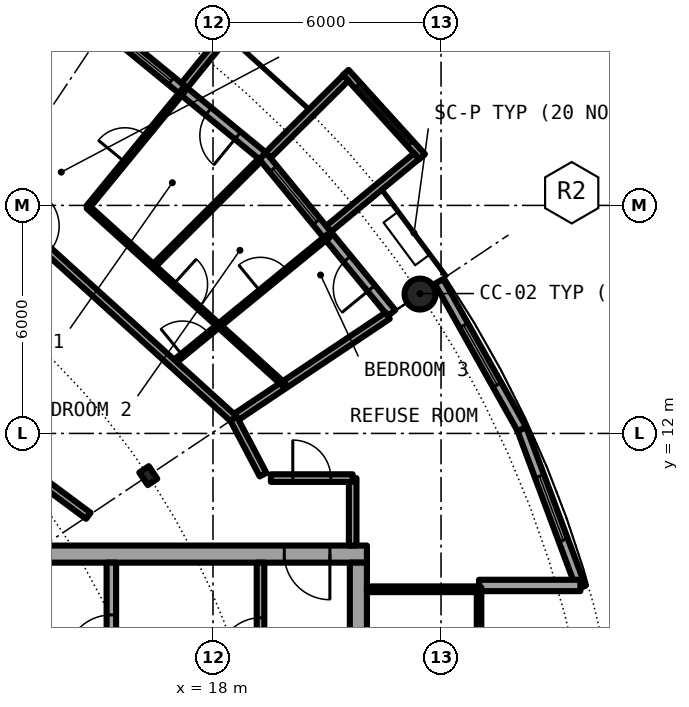
"""IFC4 building model, lengths in metres.
Left out: names, types, materials, properties, quantities, classifications, styles, units other than length and angle.
Written with IfcOpenShell. Run it as: python <this file> out.ifc"""

import sys

from ifc_helpers import new_model, si_unit, direction, frame, frame_2d, origin, origin_2d, place, context, subcontext, project, spatial, rectangle, circle, hollow_circle, i_section, extrude, element, fill, save


model = new_model("IFC4")
c1 = context("Model", 3, precision=1e-05, world=origin(), true_north=direction((0.0, 1.0)))
c2 = subcontext(c1, "Body", "Model", "MODEL_VIEW")
j1 = project(units=[si_unit("LENGTHUNIT", "METRE"), si_unit("PLANEANGLEUNIT", "RADIAN")], contexts=[c1])
p1 = place(None, origin())
s1 = spatial("IfcSite", under=j1, at=p1, CompositionType="ELEMENT")
p2 = place(p1, origin())
s2 = spatial("IfcBuilding", under=s1, at=p2, CompositionType="ELEMENT")
p3 = place(p2, frame((0.0, 0.0, 190.2)))
s3 = spatial("IfcBuildingStorey", under=s2, at=p3, CompositionType="ELEMENT", Elevation=190.2)
p4 = place(p3, frame((23.448, 15.667, 0.0), z_axis=(0.0, 0.0, 1.0), x_axis=(1.0, 0.0, 0.0)))
e1 = element("IfcColumn", 1, at=p4, inside=s3, PredefinedType="COLUMN", context=c2, shape_type="SweptSolid", body=[
    extrude(hollow_circle(Radius=0.406, WallThickness=0.03, at=origin_2d()), origin(), (0.0, 0.0, 1.0), 3.05),
])
p5 = place(p3, frame((16.297, 10.889, 0.0), z_axis=(0.0, 0.0, 1.0), x_axis=(0.831469612303, 0.55557023302, 0.0)))
e2 = element("IfcColumn", 2, at=p5, inside=s3, PredefinedType="COLUMN", context=c2, shape_type="SweptSolid", body=[
    extrude(i_section(OverallWidth=0.3, OverallDepth=0.4, WebThickness=0.013, FlangeThickness=0.024, FilletRadius=0.027, at=origin_2d()), origin(), (0.0, 0.0, 1.0), 3.05),
])
p6 = place(p3, frame((22.699, 15.167, 0.0), z_axis=(0.0, 0.0, 1.0), x_axis=(-0.634382322723, 0.773019449054, 0.0)))
e3 = element("IfcWall", 3, at=p6, inside=s3, PredefinedType="SOLIDWALL", context=c2, shape_type="SweptSolid", body=[
    extrude(rectangle(XDim=5.352, YDim=0.25, at=frame_2d((2.676, 0.0))), origin(), (0.0, 0.0, 1.0), 2.7),
])
p7 = place(p6, frame((0.841, 0.0, 0.0)))
e4 = element("IfcOpeningElement", 4, at=p7, cuts=e3, PredefinedType="OPENING", context=c2, shape_type="SweptSolid", body=[
    extrude(rectangle(XDim=1.0, YDim=2.2, at=frame_2d((0.5, 1.1))), frame((0.0, 0.135, 0.0), z_axis=(0.0, -1.0, 0.0), x_axis=(1.0, 0.0, 0.0)), (0.0, 0.0, 1.0), 0.27),
])
p8 = place(p6, frame((3.111, 0.0, 0.3)))
e5 = element("IfcOpeningElement", 5, at=p8, cuts=e3, PredefinedType="OPENING", context=c2, shape_type="SweptSolid", body=[
    extrude(rectangle(XDim=1.8, YDim=2.1, at=frame_2d((0.9, 1.05))), frame((0.0, 0.135, 0.0), z_axis=(0.0, -1.0, 0.0), x_axis=(1.0, 0.0, 0.0)), (0.0, 0.0, 1.0), 0.27),
])
p9 = place(p3, frame((23.503, 19.282, -0.03), z_axis=(0.0, 0.0, 1.0), x_axis=(-0.671506829416, 0.740998365753, 0.0)))
e6 = element("IfcWall", 6, at=p9, inside=s3, PredefinedType="SOLIDWALL", context=c2, shape_type="SweptSolid", body=[
    extrude(rectangle(XDim=2.993, YDim=0.2, at=frame_2d((1.497, 0.0))), origin(), (0.0, 0.0, 1.0), 2.73),
])
p10 = place(p9, frame((0.457, 0.0, 0.33)))
e7 = element("IfcOpeningElement", 7, at=p10, cuts=e6, PredefinedType="OPENING", context=c2, shape_type="SweptSolid", body=[
    extrude(circle(Radius=1.04, at=frame_2d((1.04, 1.04))), frame((0.0, 0.11, 0.0), z_axis=(0.0, -1.0, 0.0), x_axis=(1.0, 0.0, 0.0)), (0.0, 0.0, 1.0), 0.22),
])
p11 = place(p3, frame((21.041, 17.384, -0.03), z_axis=(0.0, 0.0, 1.0), x_axis=(0.770784861449, 0.63709551667, 0.0)))
e8 = element("IfcWall", 8, at=p11, inside=s3, PredefinedType="SOLIDWALL", context=c2, shape_type="SweptSolid", body=[
    extrude(rectangle(XDim=3.006, YDim=0.2, at=frame_2d((1.503, 0.0))), origin(), (0.0, 0.0, 1.0), 2.73),
])
p12 = place(p3, frame((19.45, 19.323, -0.03), z_axis=(0.0, 0.0, 1.0), x_axis=(0.709727076896, 0.704476739375, 0.0)))
e9 = element("IfcWall", 9, at=p12, inside=s3, PredefinedType="SOLIDWALL", context=c2, shape_type="SweptSolid", body=[
    extrude(rectangle(XDim=2.883, YDim=0.2, at=frame_2d((1.441, 0.0))), origin(), (0.0, 0.0, 1.0), 2.73),
])
p13 = place(p3, frame((19.304, 19.304, 0.0), z_axis=(0.0, 0.0, 1.0), x_axis=(-0.773019449054, 0.634382322723, 0.0)))
e10 = element("IfcWall", 10, at=p13, inside=s3, PredefinedType="SOLIDWALL", context=c2, shape_type="SweptSolid", body=[
    extrude(rectangle(XDim=5.352, YDim=0.25, at=frame_2d((2.676, 0.0))), origin(), (0.0, 0.0, 1.0), 2.7),
])
p14 = place(p13, frame((0.841, 0.0, 0.0)))
e11 = element("IfcOpeningElement", 11, at=p14, cuts=e10, PredefinedType="OPENING", context=c2, shape_type="SweptSolid", body=[
    extrude(rectangle(XDim=1.0, YDim=2.2, at=frame_2d((0.5, 1.1))), frame((0.0, 0.135, 0.0), z_axis=(0.0, -1.0, 0.0), x_axis=(1.0, 0.0, 0.0)), (0.0, 0.0, 1.0), 0.27),
])
p15 = place(p13, frame((3.111, 0.0, 0.3)))
e12 = element("IfcOpeningElement", 12, at=p15, cuts=e10, PredefinedType="OPENING", context=c2, shape_type="SweptSolid", body=[
    extrude(rectangle(XDim=1.8, YDim=2.1, at=frame_2d((0.9, 1.05))), frame((0.0, 0.135, 0.0), z_axis=(0.0, -1.0, 0.0), x_axis=(1.0, 0.0, 0.0)), (0.0, 0.0, 1.0), 0.27),
])
p16 = place(p3, frame((17.246, 21.155, -0.03), z_axis=(0.0, 0.0, 1.0), x_axis=(0.631741648902, 0.775179004516, 0.0)))
e13 = element("IfcWall", 13, at=p16, inside=s3, PredefinedType="SOLIDWALL", context=c2, shape_type="SweptSolid", body=[
    extrude(rectangle(XDim=3.006, YDim=0.2, at=frame_2d((1.503, 0.0))), origin(), (0.0, 0.0, 1.0), 2.73),
])
p17 = place(p3, frame((27.682, 7.945, 0.0), z_axis=(0.0, 0.0, 1.0), x_axis=(-0.349247811493, 0.937030397675, 0.0)))
e14 = element("IfcWall", 14, at=p17, inside=s3, PredefinedType="SOLIDWALL", context=c2, shape_type="SweptSolid", body=[
    extrude(rectangle(XDim=4.452, YDim=0.25, at=frame_2d((2.226, 0.0))), origin(), (0.0, 0.0, 1.0), 2.7),
])
p18 = place(p17, frame((1.327, 0.0, 0.3)))
e15 = element("IfcOpeningElement", 15, at=p18, cuts=e14, PredefinedType="OPENING", context=c2, shape_type="SweptSolid", body=[
    extrude(rectangle(XDim=1.8, YDim=2.1, at=frame_2d((0.9, 1.05))), frame((0.0, 0.135, 0.0), z_axis=(0.0, -1.0, 0.0), x_axis=(1.0, 0.0, 0.0)), (0.0, 0.0, 1.0), 0.27),
])
p19 = place(p3, frame((26.127, 12.117, 0.0), z_axis=(0.0, 0.0, 1.0), x_axis=(-0.489696356642, 0.871893042919, 0.0)))
e16 = element("IfcWall", 16, at=p19, inside=s3, PredefinedType="SOLIDWALL", context=c2, shape_type="SweptSolid", body=[
    extrude(rectangle(XDim=4.454, YDim=0.25, at=frame_2d((2.227, 0.0))), origin(), (0.0, 0.0, 1.0), 2.7),
])
p20 = place(p19, frame((1.327, 0.0, 0.3)))
e17 = element("IfcOpeningElement", 17, at=p20, cuts=e16, PredefinedType="OPENING", context=c2, shape_type="SweptSolid", body=[
    extrude(rectangle(XDim=1.8, YDim=2.1, at=frame_2d((0.9, 1.05))), frame((0.0, 0.135, 0.0), z_axis=(0.0, -1.0, 0.0), x_axis=(1.0, 0.0, 0.0)), (0.0, 0.0, 1.0), 0.27),
])
p21 = place(p3, frame((25.0, 8.0, 0.0), z_axis=(0.0, 0.0, 1.0), x_axis=(1.0, 0.0, 0.0)))
e18 = element("IfcWall", 18, at=p21, inside=s3, PredefinedType="SOLIDWALL", context=c2, shape_type="SweptSolid", body=[
    extrude(rectangle(XDim=2.667, YDim=0.3, at=frame_2d((1.333, 0.0))), origin(), (0.0, 0.0, 1.0), 2.7),
])
p22 = place(p3, frame((22.05, 8.825, 0.0), z_axis=(0.0, 0.0, 1.0), x_axis=(-1.0, 0.0, 0.0)))
e19 = element("IfcWall", 19, at=p22, inside=s3, PredefinedType="SHEAR", context=c2, shape_type="SweptSolid", body=[
    extrude(rectangle(XDim=13.5, YDim=0.45, at=frame_2d((6.75, 0.0))), origin(), (0.0, 0.0, 1.0), 3.05),
])
p23 = place(p22, frame((0.975, 0.0, 0.0)))
e20 = element("IfcOpeningElement", 20, at=p23, cuts=e19, PredefinedType="OPENING", context=c2, shape_type="SweptSolid", body=[
    extrude(rectangle(XDim=1.2, YDim=2.3, at=frame_2d((0.6, 1.15))), frame((0.0, 0.235, 0.0), z_axis=(0.0, -1.0, 0.0), x_axis=(1.0, 0.0, 0.0)), (0.0, 0.0, 1.0), 0.47),
])
p24 = place(p3, frame((21.825, 8.6, 0.0), z_axis=(0.0, 0.0, 1.0), x_axis=(0.0, -1.0, 0.0)))
e21 = element("IfcWall", 21, at=p24, inside=s3, PredefinedType="SHEAR", context=c2, shape_type="SweptSolid", body=[
    extrude(rectangle(XDim=17.2, YDim=0.45, at=frame_2d((8.6, 0.0))), origin(), (0.0, 0.0, 1.0), 3.05),
])
p25 = place(p24, frame((7.7, 0.0, 0.0)))
e22 = element("IfcOpeningElement", 22, at=p25, cuts=e21, PredefinedType="OPENING", context=c2, shape_type="SweptSolid", body=[
    extrude(rectangle(XDim=1.8, YDim=2.3, at=frame_2d((0.9, 1.15))), frame((0.0, 0.235, 0.0), z_axis=(0.0, -1.0, 0.0), x_axis=(1.0, 0.0, 0.0)), (0.0, 0.0, 1.0), 0.47),
])
p26 = place(p3, frame((15.325, 4.65, 0.0), z_axis=(0.0, 0.0, 1.0), x_axis=(0.0, 1.0, 0.0)))
e23 = element("IfcWall", 23, at=p26, inside=s3, PredefinedType="SHEAR", context=c2, shape_type="SweptSolid", body=[
    extrude(rectangle(XDim=3.95, YDim=0.25, at=frame_2d((1.975, 0.0))), origin(), (0.0, 0.0, 1.0), 3.05),
])
p27 = place(p26, frame((1.375, 0.0, 0.0)))
e24 = element("IfcOpeningElement", 24, at=p27, cuts=e23, PredefinedType="OPENING", context=c2, shape_type="SweptSolid", body=[
    extrude(rectangle(XDim=1.2, YDim=2.3, at=frame_2d((0.6, 1.15))), frame((0.0, 0.135, 0.0), z_axis=(0.0, -1.0, 0.0), x_axis=(1.0, 0.0, 0.0)), (0.0, 0.0, 1.0), 0.27),
])
p28 = place(p3, frame((19.25, 1.575, 0.0), z_axis=(0.0, 0.0, 1.0), x_axis=(0.0, 1.0, 0.0)))
e25 = element("IfcWall", 25, at=p28, inside=s3, PredefinedType="SOLIDWALL", context=c2, shape_type="SweptSolid", body=[
    extrude(rectangle(XDim=7.025, YDim=0.2, at=frame_2d((3.513, 0.0))), origin(), (0.0, 0.0, 1.0), 2.7),
])
p29 = place(p28, frame((4.475, 0.0, 0.0)))
e26 = element("IfcOpeningElement", 26, at=p29, cuts=e25, PredefinedType="OPENING", context=c2, shape_type="SweptSolid", body=[
    extrude(rectangle(XDim=1.1, YDim=2.3, at=frame_2d((0.55, 1.15))), frame((0.0, 0.11, 0.0), z_axis=(0.0, -1.0, 0.0), x_axis=(1.0, 0.0, 0.0)), (0.0, 0.0, 1.0), 0.22),
])
p30 = place(p3, frame((22.05, 7.9, 0.0), z_axis=(0.0, 0.0, 1.0), x_axis=(1.0, 0.0, 0.0)))
e27 = element("IfcWall", 27, at=p30, inside=s3, PredefinedType="PARTITIONING", context=c2, shape_type="SweptSolid", body=[
    extrude(rectangle(XDim=2.89, YDim=0.15, at=frame_2d((1.445, 0.0))), origin(), (0.0, 0.0, 1.0), 2.7),
])
p31 = place(p3, frame((25.0, -7.95, 0.0), z_axis=(0.0, 0.0, 1.0), x_axis=(0.0, 1.0, 0.0)))
e28 = element("IfcWall", 28, at=p31, inside=s3, PredefinedType="PARTITIONING", context=c2, shape_type="SweptSolid", body=[
    extrude(rectangle(XDim=15.9, YDim=0.12, at=frame_2d((7.95, 0.0))), origin(), (0.0, 0.0, 1.0), 2.7),
])
p32 = place(p31, frame((0.95, 0.0, 0.1)))
e29 = element("IfcOpeningElement", 29, at=p32, cuts=e28, PredefinedType="OPENING", context=c2, shape_type="SweptSolid", body=[
    extrude(rectangle(XDim=14.0, YDim=2.35, at=frame_2d((7.0, 1.175))), frame((0.0, 0.07, 0.0), z_axis=(0.0, -1.0, 0.0), x_axis=(1.0, 0.0, 0.0)), (0.0, 0.0, 1.0), 0.14),
])
p33 = place(p3, frame((21.675, 9.05, 0.0), z_axis=(0.0, 0.0, 1.0), x_axis=(0.0, 1.0, 0.0)))
e30 = element("IfcWall", 30, at=p33, inside=s3, PredefinedType="PARTITIONING", context=c2, shape_type="SweptSolid", body=[
    extrude(rectangle(XDim=1.775, YDim=0.2, at=frame_2d((0.887, 0.0))), origin(), (0.0, 0.0, 1.0), 2.7),
])
p34 = place(p3, frame((14.709, 17.958, 0.0), z_axis=(0.0, 0.0, 1.0), x_axis=(0.633590098448, 0.773668913133, 0.0)))
e31 = element("IfcWall", 31, at=p34, inside=s3, PredefinedType="PARTITIONING", context=c2, shape_type="SweptSolid", body=[
    extrude(rectangle(XDim=3.962, YDim=0.1, at=frame_2d((1.981, 0.0))), origin(), (0.0, 0.0, 1.0), 2.7),
])
p35 = place(p34, frame((1.531, 0.0, 0.0)))
e32 = element("IfcOpeningElement", 32, at=p35, cuts=e31, PredefinedType="OPENING", context=c2, shape_type="SweptSolid", body=[
    extrude(rectangle(XDim=0.9, YDim=2.3, at=frame_2d((0.45, 1.15))), frame((0.0, 0.06, 0.0), z_axis=(0.0, -1.0, 0.0), x_axis=(1.0, 0.0, 0.0)), (0.0, 0.0, 1.0), 0.12),
])
p36 = place(p3, frame((16.43, 16.398, 0.0), z_axis=(0.0, 0.0, 1.0), x_axis=(0.707722727509, 0.706490297858, 0.0)))
e33 = element("IfcWall", 33, at=p36, inside=s3, PredefinedType="PARTITIONING", context=c2, shape_type="SweptSolid", body=[
    extrude(rectangle(XDim=3.962, YDim=0.1, at=frame_2d((1.981, 0.0))), origin(), (0.0, 0.0, 1.0), 2.7),
])
p37 = place(p3, frame((16.936, 13.845, 0.0), z_axis=(0.0, 0.0, 1.0), x_axis=(0.774310172558, 0.632806255241, 0.0)))
e34 = element("IfcWall", 34, at=p37, inside=s3, PredefinedType="PARTITIONING", context=c2, shape_type="SweptSolid", body=[
    extrude(rectangle(XDim=5.3, YDim=0.1, at=frame_2d((2.65, 0.0))), origin(), (0.0, 0.0, 1.0), 2.7),
])
p38 = place(p37, frame((0.335, 0.0, 0.0)))
e35 = element("IfcOpeningElement", 35, at=p38, cuts=e34, PredefinedType="OPENING", context=c2, shape_type="SweptSolid", body=[
    extrude(rectangle(XDim=0.9, YDim=2.3, at=frame_2d((0.45, 1.15))), frame((0.0, 0.06, 0.0), z_axis=(0.0, -1.0, 0.0), x_axis=(1.0, 0.0, 0.0)), (0.0, 0.0, 1.0), 0.12),
])
p39 = place(p37, frame((2.985, 0.0, 0.0)))
e36 = element("IfcOpeningElement", 36, at=p39, cuts=e34, PredefinedType="OPENING", context=c2, shape_type="SweptSolid", body=[
    extrude(rectangle(XDim=0.9, YDim=2.3, at=frame_2d((0.45, 1.15))), frame((0.0, 0.06, 0.0), z_axis=(0.0, -1.0, 0.0), x_axis=(1.0, 0.0, 0.0)), (0.0, 0.0, 1.0), 0.12),
])
p40 = place(p3, frame((18.542, 12.389, 0.0), z_axis=(0.0, 0.0, 1.0), x_axis=(0.831387096605, 0.55569370664, 0.0)))
e37 = element("IfcWall", 37, at=p40, inside=s3, PredefinedType="PARTITIONING", context=c2, shape_type="SweptSolid", body=[
    extrude(rectangle(XDim=4.875, YDim=0.2, at=frame_2d((2.438, 0.0))), origin(), (0.0, 0.0, 1.0), 2.7),
])
p41 = place(p3, frame((19.523, 10.825, 0.0), z_axis=(0.0, 0.0, 1.0), x_axis=(1.0, 0.0, 0.0)))
e38 = element("IfcWall", 38, at=p41, inside=s3, PredefinedType="PARTITIONING", context=c2, shape_type="SweptSolid", body=[
    extrude(rectangle(XDim=2.152, YDim=0.2, at=frame_2d((1.076, 0.0))), origin(), (0.0, 0.0, 1.0), 2.7),
])
p42 = place(p41, frame((0.576, 0.0, 0.0)))
e39 = element("IfcOpeningElement", 39, at=p42, cuts=e38, PredefinedType="OPENING", context=c2, shape_type="SweptSolid", body=[
    extrude(rectangle(XDim=1.0, YDim=2.3, at=frame_2d((0.5, 1.15))), frame((0.0, 0.11, 0.0), z_axis=(0.0, -1.0, 0.0), x_axis=(1.0, 0.0, 0.0)), (0.0, 0.0, 1.0), 0.22),
])
p43 = place(p3, frame((5.137, 16.938, 0.0), z_axis=(0.0, 0.0, 1.0), x_axis=(0.803240181354, -0.595655278712, 0.0)))
e40 = element("IfcWall", 40, at=p43, inside=s3, PredefinedType="PARTITIONING", context=c2, shape_type="SweptSolid", body=[
    extrude(rectangle(XDim=11.928, YDim=0.2, at=frame_2d((5.964, 0.0))), origin(), (0.0, 0.0, 1.0), 2.7),
])
p44 = place(p43, frame((4.612, 0.0, 0.0)))
e41 = element("IfcOpeningElement", 41, at=p44, cuts=e40, PredefinedType="OPENING", context=c2, shape_type="SweptSolid", body=[
    extrude(rectangle(XDim=1.0, YDim=2.3, at=frame_2d((0.5, 1.15))), frame((0.0, 0.11, 0.0), z_axis=(0.0, -1.0, 0.0), x_axis=(1.0, 0.0, 0.0)), (0.0, 0.0, 1.0), 0.22),
])
p45 = place(p3, frame((10.512, 19.667, 0.0), z_axis=(0.0, 0.0, 1.0), x_axis=(0.740853508928, -0.671666642248, 0.0)))
e42 = element("IfcWall", 42, at=p45, inside=s3, PredefinedType="PARTITIONING", context=c2, shape_type="SweptSolid", body=[
    extrude(rectangle(XDim=10.84, YDim=0.2, at=frame_2d((5.42, 0.0))), origin(), (0.0, 0.0, 1.0), 2.7),
])
p46 = place(p45, frame((3.293, 0.0, 0.0)))
e43 = element("IfcOpeningElement", 43, at=p46, cuts=e42, PredefinedType="OPENING", context=c2, shape_type="SweptSolid", body=[
    extrude(rectangle(XDim=1.0, YDim=2.3, at=frame_2d((0.5, 1.15))), frame((0.0, 0.11, 0.0), z_axis=(0.0, -1.0, 0.0), x_axis=(1.0, 0.0, 0.0)), (0.0, 0.0, 1.0), 0.22),
])
p47 = place(p3, frame((18.542, 12.389, 0.0), z_axis=(0.0, 0.0, 1.0), x_axis=(0.465359652486, -0.885121683068, 0.0)))
e44 = element("IfcWall", 44, at=p47, inside=s3, PredefinedType="PARTITIONING", context=c2, shape_type="SweptSolid", body=[
    extrude(rectangle(XDim=1.665, YDim=0.2, at=frame_2d((0.833, 0.0))), origin(), (0.0, 0.0, 1.0), 2.7),
])
p48 = place(p3, frame((14.709, 17.958, 0.0), z_axis=(0.0, 0.0, 1.0), x_axis=(0.740923753351, -0.671589153962, 0.0)))
e45 = element("IfcWall", 45, at=p48, inside=s3, PredefinedType="PARTITIONING", context=c2, shape_type="SweptSolid", body=[
    extrude(rectangle(XDim=6.969, YDim=0.1, at=frame_2d((3.484, 0.0))), origin(), (0.0, 0.0, 1.0), 2.7),
])
p49 = place(p48, frame((3.034, 0.0, 0.0)))
e46 = element("IfcOpeningElement", 46, at=p49, cuts=e45, PredefinedType="OPENING", context=c2, shape_type="SweptSolid", body=[
    extrude(rectangle(XDim=0.9, YDim=2.3, at=frame_2d((0.45, 1.15))), frame((0.0, 0.06, 0.0), z_axis=(0.0, -1.0, 0.0), x_axis=(1.0, 0.0, 0.0)), (0.0, 0.0, 1.0), 0.12),
])
p50 = place(p7, origin())
e47 = element("IfcDoor", 47, at=p50, inside=s3, OperationType="SINGLE_SWING_LEFT", PredefinedType="DOOR", context=c2, shape_type="SweptSolid", body=[
    extrude(rectangle(XDim=1.0, YDim=2.2, at=frame_2d((0.5, 1.1))), frame((0.0, 0.025, 0.0), z_axis=(0.0, -1.0, 0.0), x_axis=(1.0, 0.0, 0.0)), (0.0, 0.0, 1.0), 0.05),
])
fill(e4, e47)
p51 = place(p8, origin())
e48 = element("IfcWindow", 48, at=p51, inside=s3, PartitioningType="SINGLE_PANEL", PredefinedType="WINDOW", context=c2, shape_type="SweptSolid", body=[
    extrude(rectangle(XDim=1.8, YDim=2.1, at=frame_2d((0.9, 1.05))), frame((0.0, 0.03, 0.0), z_axis=(0.0, -1.0, 0.0), x_axis=(1.0, 0.0, 0.0)), (0.0, 0.0, 1.0), 0.06),
])
fill(e5, e48)
p52 = place(p10, origin())
e49 = element("IfcWindow", 49, at=p52, inside=s3, PartitioningType="SINGLE_PANEL", PredefinedType="WINDOW", context=c2, shape_type="SweptSolid", body=[
    extrude(circle(Radius=1.04, at=frame_2d((1.04, 1.04))), frame((0.0, 0.03, 0.0), z_axis=(0.0, -1.0, 0.0), x_axis=(1.0, 0.0, 0.0)), (0.0, 0.0, 1.0), 0.06),
])
fill(e7, e49)
p53 = place(p14, origin())
e50 = element("IfcDoor", 50, at=p53, inside=s3, OperationType="SINGLE_SWING_LEFT", PredefinedType="DOOR", context=c2, shape_type="SweptSolid", body=[
    extrude(rectangle(XDim=1.0, YDim=2.2, at=frame_2d((0.5, 1.1))), frame((0.0, 0.025, 0.0), z_axis=(0.0, -1.0, 0.0), x_axis=(1.0, 0.0, 0.0)), (0.0, 0.0, 1.0), 0.05),
])
fill(e11, e50)
p54 = place(p15, origin())
e51 = element("IfcWindow", 51, at=p54, inside=s3, PartitioningType="SINGLE_PANEL", PredefinedType="WINDOW", context=c2, shape_type="SweptSolid", body=[
    extrude(rectangle(XDim=1.8, YDim=2.1, at=frame_2d((0.9, 1.05))), frame((0.0, 0.03, 0.0), z_axis=(0.0, -1.0, 0.0), x_axis=(1.0, 0.0, 0.0)), (0.0, 0.0, 1.0), 0.06),
])
fill(e12, e51)
p55 = place(p18, origin())
e52 = element("IfcWindow", 52, at=p55, inside=s3, PartitioningType="SINGLE_PANEL", PredefinedType="WINDOW", context=c2, shape_type="SweptSolid", body=[
    extrude(rectangle(XDim=1.8, YDim=2.1, at=frame_2d((0.9, 1.05))), frame((0.0, 0.03, 0.0), z_axis=(0.0, -1.0, 0.0), x_axis=(1.0, 0.0, 0.0)), (0.0, 0.0, 1.0), 0.06),
])
fill(e15, e52)
p56 = place(p20, origin())
e53 = element("IfcWindow", 53, at=p56, inside=s3, PartitioningType="SINGLE_PANEL", PredefinedType="WINDOW", context=c2, shape_type="SweptSolid", body=[
    extrude(rectangle(XDim=1.8, YDim=2.1, at=frame_2d((0.9, 1.05))), frame((0.0, 0.03, 0.0), z_axis=(0.0, -1.0, 0.0), x_axis=(1.0, 0.0, 0.0)), (0.0, 0.0, 1.0), 0.06),
])
fill(e17, e53)
p57 = place(p27, origin())
e54 = element("IfcDoor", 54, at=p57, inside=s3, OperationType="SINGLE_SWING_LEFT", PredefinedType="DOOR", context=c2, shape_type="SweptSolid", body=[
    extrude(rectangle(XDim=1.2, YDim=2.3, at=frame_2d((0.6, 1.15))), frame((0.0, 0.025, 0.0), z_axis=(0.0, -1.0, 0.0), x_axis=(1.0, 0.0, 0.0)), (0.0, 0.0, 1.0), 0.05),
])
fill(e24, e54)
p58 = place(p29, origin())
e55 = element("IfcDoor", 55, at=p58, inside=s3, OperationType="SINGLE_SWING_LEFT", PredefinedType="DOOR", context=c2, shape_type="SweptSolid", body=[
    extrude(rectangle(XDim=1.1, YDim=2.3, at=frame_2d((0.55, 1.15))), frame((0.0, 0.025, 0.0), z_axis=(0.0, -1.0, 0.0), x_axis=(1.0, 0.0, 0.0)), (0.0, 0.0, 1.0), 0.05),
])
fill(e26, e55)
p59 = place(p23, origin())
e56 = element("IfcDoor", 56, at=p59, inside=s3, OperationType="SINGLE_SWING_RIGHT", PredefinedType="DOOR", context=c2, shape_type="SweptSolid", body=[
    extrude(rectangle(XDim=1.2, YDim=2.3, at=frame_2d((0.6, 1.15))), frame((0.0, 0.025, 0.0), z_axis=(0.0, -1.0, 0.0), x_axis=(1.0, 0.0, 0.0)), (0.0, 0.0, 1.0), 0.05),
])
fill(e20, e56)
p60 = place(p32, origin())
e57 = element("IfcWindow", 57, at=p60, inside=s3, PartitioningType="SINGLE_PANEL", PredefinedType="WINDOW", context=c2, shape_type="SweptSolid", body=[
    extrude(rectangle(XDim=14.0, YDim=2.35, at=frame_2d((7.0, 1.175))), frame((0.0, 0.03, 0.0), z_axis=(0.0, -1.0, 0.0), x_axis=(1.0, 0.0, 0.0)), (0.0, 0.0, 1.0), 0.06),
])
fill(e29, e57)
p61 = place(p38, origin())
e58 = element("IfcDoor", 58, at=p61, inside=s3, OperationType="SINGLE_SWING_LEFT", PredefinedType="DOOR", context=c2, shape_type="SweptSolid", body=[
    extrude(rectangle(XDim=0.9, YDim=2.3, at=frame_2d((0.45, 1.15))), frame((0.0, 0.025, 0.0), z_axis=(0.0, -1.0, 0.0), x_axis=(1.0, 0.0, 0.0)), (0.0, 0.0, 1.0), 0.05),
])
fill(e35, e58)
p62 = place(p35, origin())
e59 = element("IfcDoor", 59, at=p62, inside=s3, OperationType="SINGLE_SWING_RIGHT", PredefinedType="DOOR", context=c2, shape_type="SweptSolid", body=[
    extrude(rectangle(XDim=0.9, YDim=2.3, at=frame_2d((0.45, 1.15))), frame((0.0, 0.025, 0.0), z_axis=(0.0, -1.0, 0.0), x_axis=(1.0, 0.0, 0.0)), (0.0, 0.0, 1.0), 0.05),
])
fill(e32, e59)
p63 = place(p49, origin())
e60 = element("IfcDoor", 60, at=p63, inside=s3, OperationType="SINGLE_SWING_LEFT", PredefinedType="DOOR", context=c2, shape_type="SweptSolid", body=[
    extrude(rectangle(XDim=0.9, YDim=2.3, at=frame_2d((0.45, 1.15))), frame((0.0, 0.025, 0.0), z_axis=(0.0, -1.0, 0.0), x_axis=(1.0, 0.0, 0.0)), (0.0, 0.0, 1.0), 0.05),
])
fill(e46, e60)
p64 = place(p39, origin())
e61 = element("IfcDoor", 61, at=p64, inside=s3, OperationType="SINGLE_SWING_RIGHT", PredefinedType="DOOR", context=c2, shape_type="SweptSolid", body=[
    extrude(rectangle(XDim=0.9, YDim=2.3, at=frame_2d((0.45, 1.15))), frame((0.0, 0.025, 0.0), z_axis=(0.0, -1.0, 0.0), x_axis=(1.0, 0.0, 0.0)), (0.0, 0.0, 1.0), 0.05),
])
fill(e36, e61)
p65 = place(p42, origin())
e62 = element("IfcDoor", 62, at=p65, inside=s3, OperationType="SINGLE_SWING_LEFT", PredefinedType="DOOR", context=c2, shape_type="SweptSolid", body=[
    extrude(rectangle(XDim=1.0, YDim=2.3, at=frame_2d((0.5, 1.15))), frame((0.0, 0.025, 0.0), z_axis=(0.0, -1.0, 0.0), x_axis=(1.0, 0.0, 0.0)), (0.0, 0.0, 1.0), 0.05),
])
fill(e39, e62)
save(model, sys.argv[1])
